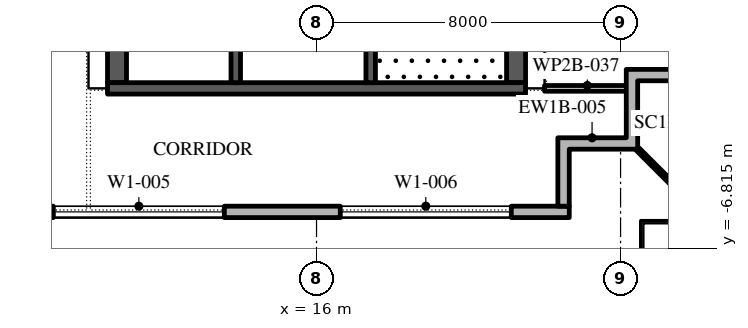
"""IFC4 building model, lengths in metres.
Left out: names, types, materials, properties, quantities, classifications, styles, units other than length and angle.
Written with IfcOpenShell. Run it as: python <this file> out.ifc"""

import sys

from ifc_helpers import new_model, si_unit, direction, frame, frame_2d, origin, place, context, subcontext, project, spatial, polyline, rectangle, outline, extrude, element, fill, save


model = new_model("IFC4")
c1 = context("Model", 3, precision=1e-05, world=origin(), true_north=direction((0.0, 1.0)))
c2 = subcontext(c1, "Body", "Model", "MODEL_VIEW")
j1 = project(units=[si_unit("LENGTHUNIT", "METRE"), si_unit("PLANEANGLEUNIT", "RADIAN")], contexts=[c1])
p1 = place(None, origin())
s1 = spatial("IfcSite", under=j1, at=p1, CompositionType="ELEMENT")
p2 = place(p1, origin())
s2 = spatial("IfcBuilding", under=s1, at=p2, CompositionType="ELEMENT")
p3 = place(p2, frame((0.0, 0.0, 355.2)))
s3 = spatial("IfcBuildingStorey", under=s2, at=p3, CompositionType="ELEMENT", Elevation=355.2)
p4 = place(p3, frame((-22.35, -5.85, 0.0), z_axis=(0.0, 0.0, 1.0), x_axis=(1.0, 0.0, 0.0)))
e1 = element("IfcWall", 1, at=p4, inside=s3, PredefinedType="STANDARD", context=c2, shape_type="SweptSolid", body=[
    extrude(rectangle(XDim=45.0, YDim=0.3, at=frame_2d((22.5, 0.0))), origin(), (0.0, 0.0, 1.0), 3.95),
])
p5 = place(p4, frame((1.375, 0.0, 0.45)))
e2 = element("IfcOpeningElement", 2, at=p5, cuts=e1, PredefinedType="OPENING", context=c2, shape_type="SweptSolid", body=[
    extrude(rectangle(XDim=4.5, YDim=3.05, at=frame_2d((2.25, 1.525))), frame((0.0, 0.16, 0.0), z_axis=(0.0, -1.0, 0.0), x_axis=(1.0, 0.0, 0.0)), (0.0, 0.0, 1.0), 0.32),
])
p6 = place(p4, frame((8.775, 0.0, 0.45)))
e3 = element("IfcOpeningElement", 3, at=p6, cuts=e1, PredefinedType="OPENING", context=c2, shape_type="SweptSolid", body=[
    extrude(rectangle(XDim=4.5, YDim=3.05, at=frame_2d((2.25, 1.525))), frame((0.0, 0.16, 0.0), z_axis=(0.0, -1.0, 0.0), x_axis=(1.0, 0.0, 0.0)), (0.0, 0.0, 1.0), 0.32),
])
p7 = place(p4, frame((17.375, 0.0, 0.0)))
e4 = element("IfcOpeningElement", 4, at=p7, cuts=e1, PredefinedType="OPENING", context=c2, shape_type="SweptSolid", body=[
    extrude(rectangle(XDim=2.4, YDim=3.5, at=frame_2d((1.2, 1.75))), frame((0.0, 0.16, 0.0), z_axis=(0.0, -1.0, 0.0), x_axis=(1.0, 0.0, 0.0)), (0.0, 0.0, 1.0), 0.32),
])
p8 = place(p4, frame((23.875, 0.0, 0.45)))
e5 = element("IfcOpeningElement", 5, at=p8, cuts=e1, PredefinedType="OPENING", context=c2, shape_type="SweptSolid", body=[
    extrude(rectangle(XDim=4.5, YDim=3.05, at=frame_2d((2.25, 1.525))), frame((0.0, 0.16, 0.0), z_axis=(0.0, -1.0, 0.0), x_axis=(1.0, 0.0, 0.0)), (0.0, 0.0, 1.0), 0.32),
])
p9 = place(p4, frame((31.425, 0.0, 0.45)))
e6 = element("IfcOpeningElement", 6, at=p9, cuts=e1, PredefinedType="OPENING", context=c2, shape_type="SweptSolid", body=[
    extrude(rectangle(XDim=4.5, YDim=3.05, at=frame_2d((2.25, 1.525))), frame((0.0, 0.16, 0.0), z_axis=(0.0, -1.0, 0.0), x_axis=(1.0, 0.0, 0.0)), (0.0, 0.0, 1.0), 0.32),
])
p10 = place(p4, frame((38.975, 0.0, 0.45)))
e7 = element("IfcOpeningElement", 7, at=p10, cuts=e1, PredefinedType="OPENING", context=c2, shape_type="SweptSolid", body=[
    extrude(rectangle(XDim=4.5, YDim=3.05, at=frame_2d((2.25, 1.525))), frame((0.0, 0.16, 0.0), z_axis=(0.0, -1.0, 0.0), x_axis=(1.0, 0.0, 0.0)), (0.0, 0.0, 1.0), 0.32),
])
p11 = place(p3, origin())
e8 = element("IfcWall", 8, at=p11, inside=s3, PredefinedType="STANDARD", context=c2, shape_type="SweptSolid", body=[
    extrude(outline(polyline([(24.15, -3.9), (24.15, -2.1), (26.25, -2.1), (26.25, -2.4), (24.45, -2.4), (24.45, -4.2), (22.65, -4.2), (22.65, -5.7), (22.35, -5.7), (22.35, -3.9), (24.15, -3.9)])), origin(), (0.0, 0.0, 1.0), 3.95),
])
p12 = place(p3, frame((24.45, -4.2, -0.05), z_axis=(0.0, 0.0, 1.0), x_axis=(0.707106781187, -0.707106781187, 0.0)))
e9 = element("IfcWall", 9, at=p12, inside=s3, PredefinedType="STANDARD", context=c2, shape_type="SweptSolid", body=[
    extrude(rectangle(XDim=2.667, YDim=0.1, at=frame_2d((1.333, 0.0))), origin(), (0.0, 0.0, 1.0), 4.0),
])
p13 = place(p3, frame((21.25, -2.45, 0.0), z_axis=(0.0, 0.0, 1.0), x_axis=(0.0, 1.0, 0.0)))
e10 = element("IfcWall", 10, at=p13, inside=s3, PredefinedType="SHEAR", context=c2, shape_type="SweptSolid", body=[
    extrude(rectangle(XDim=27.9, YDim=0.5, at=frame_2d((13.95, 0.0))), origin(), (0.0, 0.0, 1.0), 3.95),
])
p14 = place(p13, frame((5.05, 0.0, 0.0)))
e11 = element("IfcOpeningElement", 11, at=p14, cuts=e10, PredefinedType="OPENING", context=c2, shape_type="SweptSolid", body=[
    extrude(rectangle(XDim=1.2, YDim=2.1, at=frame_2d((0.6, 1.05))), frame((0.0, 0.26, 0.0), z_axis=(0.0, -1.0, 0.0), x_axis=(1.0, 0.0, 0.0)), (0.0, 0.0, 1.0), 0.52),
])
p15 = place(p13, frame((21.65, 0.0, 0.0)))
e12 = element("IfcOpeningElement", 12, at=p15, cuts=e10, PredefinedType="OPENING", context=c2, shape_type="SweptSolid", body=[
    extrude(rectangle(XDim=1.2, YDim=2.1, at=frame_2d((0.6, 1.05))), frame((0.0, 0.26, 0.0), z_axis=(0.0, -1.0, 0.0), x_axis=(1.0, 0.0, 0.0)), (0.0, 0.0, 1.0), 0.52),
])
p16 = place(p3, frame((10.75, -2.45, 0.0), z_axis=(0.0, 0.0, 1.0), x_axis=(0.0, 1.0, 0.0)))
e13 = element("IfcWall", 13, at=p16, inside=s3, PredefinedType="SHEAR", context=c2, shape_type="SweptSolid", body=[
    extrude(rectangle(XDim=27.9, YDim=0.5, at=frame_2d((13.95, 0.0))), origin(), (0.0, 0.0, 1.0), 3.95),
])
p17 = place(p16, frame((23.65, 0.0, 0.0)))
e14 = element("IfcOpeningElement", 14, at=p17, cuts=e13, PredefinedType="OPENING", context=c2, shape_type="SweptSolid", body=[
    extrude(rectangle(XDim=2.4, YDim=2.1, at=frame_2d((1.2, 1.05))), frame((0.0, 0.26, 0.0), z_axis=(0.0, -1.0, 0.0), x_axis=(1.0, 0.0, 0.0)), (0.0, 0.0, 1.0), 0.52),
])
p18 = place(p16, frame((1.087, 0.0, 0.0)))
e15 = element("IfcOpeningElement", 15, at=p18, cuts=e13, PredefinedType="OPENING", context=c2, shape_type="SweptSolid", body=[
    extrude(rectangle(XDim=0.9, YDim=2.1, at=frame_2d((0.45, 1.05))), frame((0.0, 0.26, 0.0), z_axis=(0.0, -1.0, 0.0), x_axis=(1.0, 0.0, 0.0)), (0.0, 0.0, 1.0), 0.52),
])
p19 = place(p16, frame((4.262, 0.0, 0.0)))
e16 = element("IfcOpeningElement", 16, at=p19, cuts=e13, PredefinedType="OPENING", context=c2, shape_type="SweptSolid", body=[
    extrude(rectangle(XDim=1.0, YDim=2.1, at=frame_2d((0.5, 1.05))), frame((0.0, 0.26, 0.0), z_axis=(0.0, -1.0, 0.0), x_axis=(1.0, 0.0, 0.0)), (0.0, 0.0, 1.0), 0.52),
])
p20 = place(p3, frame((10.5, -2.6, 0.0), z_axis=(0.0, 0.0, 1.0), x_axis=(1.0, 0.0, 0.0)))
e17 = element("IfcWall", 17, at=p20, inside=s3, PredefinedType="SHEAR", context=c2, shape_type="SweptSolid", body=[
    extrude(rectangle(XDim=11.0, YDim=0.3, at=frame_2d((5.5, 0.0))), origin(), (0.0, 0.0, 1.0), 3.95),
])
p21 = place(p3, frame((17.425, -2.45, 0.0), z_axis=(0.0, 0.0, 1.0), x_axis=(0.0, 1.0, 0.0)))
e18 = element("IfcWall", 18, at=p21, inside=s3, PredefinedType="SHEAR", context=c2, shape_type="SweptSolid", body=[
    extrude(rectangle(XDim=6.3, YDim=0.25, at=frame_2d((3.15, 0.0))), origin(), (0.0, 0.0, 1.0), 3.95),
])
p22 = place(p21, frame((5.05, 0.0, 0.0)))
e19 = element("IfcOpeningElement", 19, at=p22, cuts=e18, PredefinedType="OPENING", context=c2, shape_type="SweptSolid", body=[
    extrude(rectangle(XDim=1.2, YDim=2.1, at=frame_2d((0.6, 1.05))), frame((0.0, 0.135, 0.0), z_axis=(0.0, -1.0, 0.0), x_axis=(1.0, 0.0, 0.0)), (0.0, 0.0, 1.0), 0.27),
])
p23 = place(p3, frame((13.875, -2.45, 0.0), z_axis=(0.0, 0.0, 1.0), x_axis=(0.0, 1.0, 0.0)))
e20 = element("IfcWall", 20, at=p23, inside=s3, PredefinedType="SHEAR", context=c2, shape_type="SweptSolid", body=[
    extrude(rectangle(XDim=21.3, YDim=0.25, at=frame_2d((10.65, 0.0))), origin(), (0.0, 0.0, 1.0), 3.95),
])
p24 = place(p23, frame((11.357, 0.0, 0.0)))
e21 = element("IfcOpeningElement", 21, at=p24, cuts=e20, PredefinedType="OPENING", context=c2, shape_type="SweptSolid", body=[
    extrude(rectangle(XDim=0.9, YDim=2.1, at=frame_2d((0.45, 1.05))), frame((0.0, 0.135, 0.0), z_axis=(0.0, -1.0, 0.0), x_axis=(1.0, 0.0, 0.0)), (0.0, 0.0, 1.0), 0.27),
])
p25 = place(p23, frame((6.971, 0.0, 0.0)))
e22 = element("IfcOpeningElement", 22, at=p25, cuts=e20, PredefinedType="OPENING", context=c2, shape_type="SweptSolid", body=[
    extrude(rectangle(XDim=1.1, YDim=2.1, at=frame_2d((0.55, 1.05))), frame((0.0, 0.135, 0.0), z_axis=(0.0, -1.0, 0.0), x_axis=(1.0, 0.0, 0.0)), (0.0, 0.0, 1.0), 0.27),
])
p26 = place(p23, frame((15.543, 0.0, 0.0)))
e23 = element("IfcOpeningElement", 23, at=p26, cuts=e20, PredefinedType="OPENING", context=c2, shape_type="SweptSolid", body=[
    extrude(rectangle(XDim=1.1, YDim=2.1, at=frame_2d((0.55, 1.05))), frame((0.0, 0.135, 0.0), z_axis=(0.0, -1.0, 0.0), x_axis=(1.0, 0.0, 0.0)), (0.0, 0.0, 1.0), 0.27),
])
p27 = place(p23, frame((17.686, 0.0, 0.0)))
e24 = element("IfcOpeningElement", 24, at=p27, cuts=e20, PredefinedType="OPENING", context=c2, shape_type="SweptSolid", body=[
    extrude(rectangle(XDim=1.1, YDim=2.1, at=frame_2d((0.55, 1.05))), frame((0.0, 0.135, 0.0), z_axis=(0.0, -1.0, 0.0), x_axis=(1.0, 0.0, 0.0)), (0.0, 0.0, 1.0), 0.27),
])
p28 = place(p23, frame((19.829, 0.0, 0.0)))
e25 = element("IfcOpeningElement", 25, at=p28, cuts=e20, PredefinedType="OPENING", context=c2, shape_type="SweptSolid", body=[
    extrude(rectangle(XDim=1.1, YDim=2.1, at=frame_2d((0.55, 1.05))), frame((0.0, 0.135, 0.0), z_axis=(0.0, -1.0, 0.0), x_axis=(1.0, 0.0, 0.0)), (0.0, 0.0, 1.0), 0.27),
])
p29 = place(p3, frame((22.0, -2.6, 0.0), z_axis=(0.0, 0.0, 1.0), x_axis=(1.0, 0.0, 0.0)))
e26 = element("IfcWall", 26, at=p29, inside=s3, PredefinedType="PARTITIONING", context=c2, shape_type="SweptSolid", body=[
    extrude(rectangle(XDim=2.25, YDim=0.15, at=frame_2d((1.125, 0.0))), origin(), (0.0, 0.0, 1.0), 3.95),
])
p30 = place(p9, origin())
e27 = element("IfcWindow", 27, at=p30, inside=s3, PartitioningType="DOUBLE_PANEL_VERTICAL", PredefinedType="WINDOW", context=c2, shape_type="SweptSolid", body=[
    extrude(rectangle(XDim=4.5, YDim=3.05, at=frame_2d((2.25, 1.525))), frame((0.0, 0.03, 0.0), z_axis=(0.0, -1.0, 0.0), x_axis=(1.0, 0.0, 0.0)), (0.0, 0.0, 1.0), 0.06),
])
fill(e6, e27)
p31 = place(p10, origin())
e28 = element("IfcWindow", 28, at=p31, inside=s3, PartitioningType="DOUBLE_PANEL_VERTICAL", PredefinedType="WINDOW", context=c2, shape_type="SweptSolid", body=[
    extrude(rectangle(XDim=4.5, YDim=3.05, at=frame_2d((2.25, 1.525))), frame((0.0, 0.03, 0.0), z_axis=(0.0, -1.0, 0.0), x_axis=(1.0, 0.0, 0.0)), (0.0, 0.0, 1.0), 0.06),
])
fill(e7, e28)
save(model, sys.argv[1])
